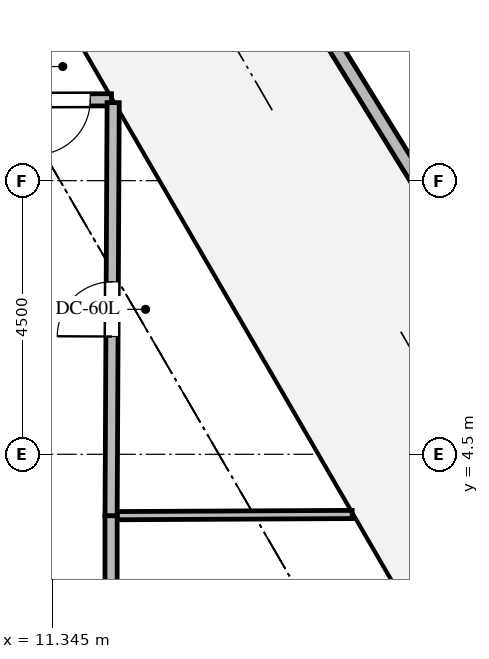
"""IFC4 building model, lengths in metres.
Left out: names, types, materials, properties, quantities, classifications, styles, units other than length and angle.
Written with IfcOpenShell. Run it as: python <this file> out.ifc"""

import sys

from ifc_helpers import new_model, si_unit, direction, frame, frame_2d, origin, place, context, subcontext, project, spatial, rectangle, extrude, source, transform, mapped, element, fill, save


model = new_model("IFC4")
c1 = context("Model", 3, precision=1e-05, world=origin(), true_north=direction((0.0, 1.0)))
c2 = subcontext(c1, "Body", "Model", "MODEL_VIEW")
j1 = project(units=[si_unit("LENGTHUNIT", "METRE"), si_unit("PLANEANGLEUNIT", "RADIAN")], contexts=[c1])
p1 = place(None, origin())
s1 = spatial("IfcSite", under=j1, at=p1, CompositionType="ELEMENT")
p2 = place(p1, origin())
s2 = spatial("IfcBuilding", under=s1, at=p2, CompositionType="ELEMENT")
p3 = place(p2, frame((0.0, 0.0, 213.4)))
s3 = spatial("IfcBuildingStorey", under=s2, at=p3, CompositionType="ELEMENT", Elevation=213.4)
p4 = place(p3, frame((13.512, 15.216, 0.0), z_axis=(0.0, 0.0, 1.0), x_axis=(0.52569294399, -0.85067439637, 0.0)))
e1 = element("IfcWall", 1, at=p4, inside=s3, PredefinedType="PARAPET", context=c2, shape_type="SweptSolid", body=[
    extrude(rectangle(XDim=18.029, YDim=0.22, at=frame_2d((9.015, 0.0))), origin(), (0.0, 0.0, 1.0), 1.2),
])
p5 = place(p3, frame((12.318, 10.33, 0.0), z_axis=(0.0, 0.0, 1.0), x_axis=(-0.999994876599, -0.003201058528, 0.0)))
e2 = element("IfcWall", 2, at=p5, inside=s3, PredefinedType="SOLIDWALL", context=c2, shape_type="SweptSolid", body=[
    extrude(rectangle(XDim=6.178, YDim=0.2, at=frame_2d((3.089, 0.0))), origin(), (0.0, 0.0, 1.0), 3.901),
])
p6 = place(p5, frame((0.35, 0.0, 0.0)))
e3 = element("IfcOpeningElement", 3, at=p6, cuts=e2, PredefinedType="OPENING", context=c2, shape_type="SweptSolid", body=[
    extrude(rectangle(XDim=0.9, YDim=2.05, at=frame_2d((0.45, 1.025))), frame((0.0, 0.11, 0.0), z_axis=(0.0, -1.0, 0.0), x_axis=(1.0, 0.0, 0.0)), (0.0, 0.0, 1.0), 0.22),
])
p7 = place(p3, frame((12.31, -3.41, 0.0), z_axis=(0.0, 0.0, 1.0), x_axis=(0.0, 1.0, 0.0)))
e4 = element("IfcWall", 4, at=p7, inside=s3, PredefinedType="SOLIDWALL", context=c2, shape_type="SweptSolid", body=[
    extrude(rectangle(XDim=6.9, YDim=0.2, at=frame_2d((3.45, 0.0))), origin(), (0.0, 0.0, 1.0), 3.901),
])
p8 = place(p7, frame((3.0, 0.0, 0.0)))
e5 = element("IfcOpeningElement", 5, at=p8, cuts=e4, PredefinedType="OPENING", context=c2, shape_type="SweptSolid", body=[
    extrude(rectangle(XDim=0.9, YDim=2.05, at=frame_2d((0.45, 1.025))), frame((0.0, 0.11, 0.0), z_axis=(0.0, -1.0, 0.0), x_axis=(1.0, 0.0, 0.0)), (0.0, 0.0, 1.0), 0.22),
])
p9 = place(p3, frame((12.31, 3.49, 0.0), z_axis=(0.0, 0.0, 1.0), x_axis=(0.005031021246, 0.999987344333, 0.0)))
e6 = element("IfcWall", 6, at=p9, inside=s3, PredefinedType="SOLIDWALL", context=c2, shape_type="SweptSolid", body=[
    extrude(rectangle(XDim=6.794, YDim=0.2, at=frame_2d((3.397, 0.0))), origin(), (0.0, 0.0, 1.0), 3.999),
])
p10 = place(p9, frame((2.947, 0.0, 0.0)))
e7 = element("IfcOpeningElement", 7, at=p10, cuts=e6, PredefinedType="OPENING", context=c2, shape_type="SweptSolid", body=[
    extrude(rectangle(XDim=0.9, YDim=2.05, at=frame_2d((0.45, 1.025))), frame((0.0, 0.11, 0.0), z_axis=(0.0, -1.0, 0.0), x_axis=(1.0, 0.0, 0.0)), (0.0, 0.0, 1.0), 0.22),
])
p11 = place(p3, frame((12.414, 3.49, 0.0), z_axis=(0.0, 0.0, 1.0), x_axis=(0.999987207709, 0.005058104237, 0.0)))
e8 = element("IfcWall", 8, at=p11, inside=s3, PredefinedType="PARTITIONING", context=c2, shape_type="SweptSolid", body=[
    extrude(rectangle(XDim=3.861, YDim=0.135, at=frame_2d((1.931, 0.0))), origin(), (0.0, 0.0, 1.0), 3.999),
])
m1 = source(origin(), c2, "Body", "SweptSolid", [
    extrude(rectangle(XDim=0.9, YDim=2.05, at=frame_2d((0.45, 1.025))), frame((0.0, 0.025, 0.0), z_axis=(0.0, -1.0, 0.0), x_axis=(1.0, 0.0, 0.0)), (0.0, 0.0, 1.0), 0.05),
])
p12 = place(p6, origin())
e9 = element("IfcDoor", 9, at=p12, inside=s3, OperationType="SINGLE_SWING_RIGHT", PredefinedType="DOOR", context=c2, shape_type="MappedRepresentation", body=[
    mapped(m1, transform((0.0, 0.0, 0.0), x_axis=(1.0, 0.0, 0.0), y_axis=(0.0, 1.0, 0.0), z_axis=(0.0, 0.0, 1.0), scale=1.0)),
])
fill(e3, e9)
m2 = source(origin(), c2, "Body", "SweptSolid", [
    extrude(rectangle(XDim=0.9, YDim=2.05, at=frame_2d((0.45, 1.025))), frame((0.0, 0.025, 0.0), z_axis=(0.0, -1.0, 0.0), x_axis=(1.0, 0.0, 0.0)), (0.0, 0.0, 1.0), 0.05),
])
p13 = place(p10, origin())
e10 = element("IfcDoor", 10, at=p13, inside=s3, OperationType="SINGLE_SWING_LEFT", PredefinedType="DOOR", context=c2, shape_type="MappedRepresentation", body=[
    mapped(m2, transform((0.0, 0.0, 0.0), x_axis=(1.0, 0.0, 0.0), y_axis=(0.0, 1.0, 0.0), z_axis=(0.0, 0.0, 1.0), scale=1.0)),
])
fill(e7, e10)
save(model, sys.argv[1])
